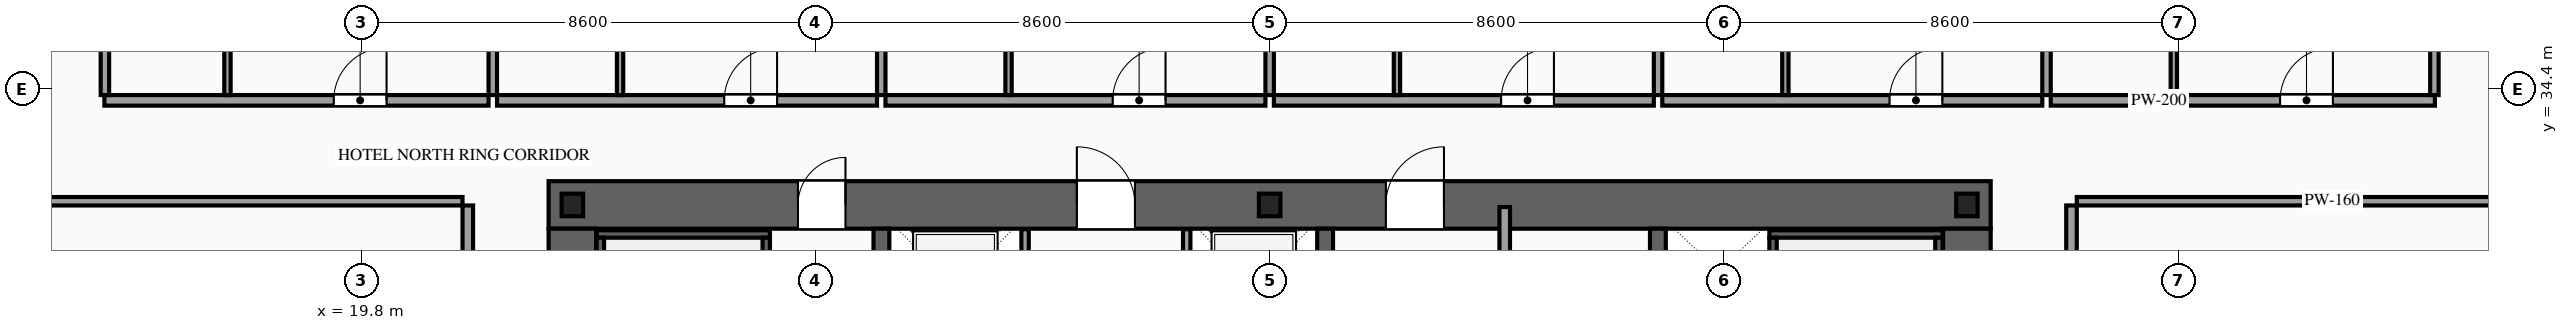
"""IFC4 building model, lengths in metres.
Left out: names, types, materials, properties, quantities, classifications, styles, units other than length and angle.
Written with IfcOpenShell. Run it as: python <this file> out.ifc"""

import sys

from ifc_helpers import new_model, si_unit, direction, frame, frame_2d, origin, origin_2d, place, context, subcontext, project, spatial, rectangle, i_section, extrude, source, transform, mapped, element, fill, save


model = new_model("IFC4")
c1 = context("Model", 3, precision=1e-05, world=origin(), true_north=direction((0.0, 1.0)))
c2 = subcontext(c1, "Body", "Model", "MODEL_VIEW")
j1 = project(units=[si_unit("LENGTHUNIT", "METRE"), si_unit("PLANEANGLEUNIT", "RADIAN")], contexts=[c1])
p1 = place(None, origin())
s1 = spatial("IfcSite", under=j1, at=p1, CompositionType="ELEMENT")
p2 = place(p1, origin())
s2 = spatial("IfcBuilding", under=s1, at=p2, CompositionType="ELEMENT")
p3 = place(p2, frame((0.0, 0.0, 37.8)))
s3 = spatial("IfcBuildingStorey", under=s2, at=p3, CompositionType="ELEMENT", Elevation=37.8)
p4 = place(p3, frame((23.35, 32.2, 0.0), z_axis=(0.0, 0.0, 1.0), x_axis=(1.0, 0.0, 0.0)))
e1 = element("IfcWall", 1, at=p4, inside=s3, PredefinedType="SHEAR", context=c2, shape_type="SweptSolid", body=[
    extrude(rectangle(XDim=27.3, YDim=0.9, at=frame_2d((13.65, 0.0))), origin(), (0.0, 0.0, 1.0), 3.6),
])
p5 = place(p4, frame((4.72, 0.0, 0.0)))
e2 = element("IfcOpeningElement", 2, at=p5, cuts=e1, PredefinedType="OPENING", context=c2, shape_type="SweptSolid", body=[
    extrude(rectangle(XDim=0.9, YDim=2.15, at=frame_2d((0.45, 1.075))), frame((0.0, 0.465, 0.0), z_axis=(0.0, -1.0, 0.0), x_axis=(1.0, 0.0, 0.0)), (0.0, 0.0, 1.0), 0.93),
])
p6 = place(p4, frame((10.0, 0.0, 0.0)))
e3 = element("IfcOpeningElement", 3, at=p6, cuts=e1, PredefinedType="OPENING", context=c2, shape_type="SweptSolid", body=[
    extrude(rectangle(XDim=1.1, YDim=2.2, at=frame_2d((0.55, 1.1))), frame((0.0, 0.465, 0.0), z_axis=(0.0, -1.0, 0.0), x_axis=(1.0, 0.0, 0.0)), (0.0, 0.0, 1.0), 0.93),
])
p7 = place(p4, frame((15.85, 0.0, 0.0)))
e4 = element("IfcOpeningElement", 4, at=p7, cuts=e1, PredefinedType="OPENING", context=c2, shape_type="SweptSolid", body=[
    extrude(rectangle(XDim=1.1, YDim=2.2, at=frame_2d((0.55, 1.1))), frame((0.0, 0.465, 0.0), z_axis=(0.0, -1.0, 0.0), x_axis=(1.0, 0.0, 0.0)), (0.0, 0.0, 1.0), 0.93),
])
m1 = source(origin(), c2, "Body", "SweptSolid", [
    extrude(rectangle(XDim=11.9, YDim=0.9, at=frame_2d((5.95, 0.0))), origin(), (0.0, 0.0, 1.0), 3.6),
])
for number, where, z_axis, x_axis in (
    (5, (23.8, 19.85, 0.0), (0.0, 0.0, 1.0), (0.0, 1.0, 0.0)),
    (6, (50.2, 19.85, 0.0), (0.0, 0.0, 1.0), (0.0, 1.0, 0.0)),
):
    element("IfcWall", number, at=place(p3, frame(where, z_axis=z_axis, x_axis=x_axis)), inside=s3, PredefinedType="SHEAR", context=c2, shape_type="MappedRepresentation", body=[
        mapped(m1, transform((0.0, 0.0, 0.0), scale=1.0)),
    ])
m2 = source(origin(), c2, "Body", "SweptSolid", [
    extrude(rectangle(XDim=11.9, YDim=0.3, at=frame_2d((5.95, 0.0))), origin(), (0.0, 0.0, 1.0), 3.6),
])
for number, where, z_axis, x_axis in (
    (7, (29.65, 19.85, 0.0), (0.0, 0.0, 1.0), (0.0, 1.0, 0.0)),
    (8, (38.05, 19.85, 0.0), (0.0, 0.0, 1.0), (0.0, 1.0, 0.0)),
    (9, (44.35, 19.85, 0.0), (0.0, 0.0, 1.0), (0.0, 1.0, 0.0)),
):
    element("IfcWall", number, at=place(p3, frame(where, z_axis=z_axis, x_axis=x_axis)), inside=s3, PredefinedType="SOLIDWALL", context=c2, shape_type="MappedRepresentation", body=[
        mapped(m2, transform((0.0, 0.0, 0.0), scale=1.0)),
    ])
m3 = source(origin(), c2, "Body", "SweptSolid", [
    extrude(i_section(OverallWidth=0.407, OverallDepth=0.428, WebThickness=0.02, FlangeThickness=0.035, at=origin_2d()), origin(), (0.0, 0.0, 1.0), 3.6),
])
for number, where, z_axis, x_axis in (
    (10, (23.8, 32.2, 0.0), (0.0, 0.0, 1.0), (1.0, 0.0, 0.0)),
    (11, (37.0, 32.2, 0.0), (0.0, 0.0, 1.0), (1.0, 0.0, 0.0)),
    (12, (50.2, 32.2, 0.0), (0.0, 0.0, 1.0), (1.0, 0.0, 0.0)),
):
    element("IfcColumn", number, at=place(p3, frame(where, z_axis=z_axis, x_axis=x_axis)), inside=s3, PredefinedType="COLUMN", context=c2, shape_type="MappedRepresentation", body=[
        mapped(m3, transform((0.0, 0.0, 0.0), scale=1.0)),
    ])
p8 = place(p3, frame((32.37, 29.4, 0.0), z_axis=(0.0, 0.0, 1.0), x_axis=(0.0, 1.0, 0.0)))
e13 = element("IfcWall", 13, at=p8, inside=s3, PredefinedType="SOLIDWALL", context=c2, shape_type="SweptSolid", body=[
    extrude(rectangle(XDim=2.34, YDim=0.14, at=frame_2d((1.17, 0.0))), origin(), (0.0, 0.0, 1.0), 3.32),
])
p9 = place(p8, frame((0.62, 0.0, 0.0)))
e14 = element("IfcOpeningElement", 14, at=p9, cuts=e13, PredefinedType="OPENING", context=c2, shape_type="SweptSolid", body=[
    extrude(rectangle(XDim=1.1, YDim=2.2, at=frame_2d((0.55, 1.1))), frame((0.0, 0.085, 0.0), z_axis=(0.0, -1.0, 0.0), x_axis=(1.0, 0.0, 0.0)), (0.0, 0.0, 1.0), 0.17),
])
p10 = place(p3, frame((35.43, 29.4, 0.0), z_axis=(0.0, 0.0, 1.0), x_axis=(0.0, 1.0, 0.0)))
e15 = element("IfcWall", 15, at=p10, inside=s3, PredefinedType="SOLIDWALL", context=c2, shape_type="SweptSolid", body=[
    extrude(rectangle(XDim=2.34, YDim=0.14, at=frame_2d((1.17, 0.0))), origin(), (0.0, 0.0, 1.0), 3.32),
])
p11 = place(p10, frame((0.62, 0.0, 0.0)))
e16 = element("IfcOpeningElement", 16, at=p11, cuts=e15, PredefinedType="OPENING", context=c2, shape_type="SweptSolid", body=[
    extrude(rectangle(XDim=1.1, YDim=2.2, at=frame_2d((0.55, 1.1))), frame((0.0, 0.085, 0.0), z_axis=(0.0, -1.0, 0.0), x_axis=(1.0, 0.0, 0.0)), (0.0, 0.0, 1.0), 0.17),
])
m4 = source(origin(), c2, "Body", "SweptSolid", [
    extrude(rectangle(XDim=3.28, YDim=0.14, at=frame_2d((1.64, 0.0))), origin(), (0.0, 0.0, 1.0), 3.32),
])
p12 = place(p3, frame((24.26, 31.65, 0.0), z_axis=(0.0, 0.0, 1.0), x_axis=(1.0, 0.0, 0.0)))
e17 = element("IfcWall", 17, at=p12, inside=s3, PredefinedType="SOLIDWALL", context=c2, shape_type="MappedRepresentation", body=[
    mapped(m4, transform((0.0, 0.0, 0.0), scale=1.0)),
])
m5 = source(origin(), c2, "Body", "SweptSolid", [
    extrude(rectangle(XDim=8.94, YDim=0.14, at=frame_2d((4.47, 0.0))), origin(), (0.0, 0.0, 1.0), 3.32),
])
for number, where, z_axis, x_axis in (
    (18, (24.33, 22.64, 0.0), (0.0, 0.0, 1.0), (0.0, 1.0, 0.0)),
    (19, (27.47, 22.64, 0.0), (0.0, 0.0, 1.0), (0.0, 1.0, 0.0)),
):
    element("IfcWall", number, at=place(p3, frame(where, z_axis=z_axis, x_axis=x_axis)), inside=s3, PredefinedType="SOLIDWALL", context=c2, shape_type="MappedRepresentation", body=[
        mapped(m5, transform((0.0, 0.0, 0.0), scale=1.0)),
    ])
p13 = place(p3, frame((46.46, 31.65, 0.0), z_axis=(0.0, 0.0, 1.0), x_axis=(1.0, 0.0, 0.0)))
e20 = element("IfcWall", 20, at=p13, inside=s3, PredefinedType="SOLIDWALL", context=c2, shape_type="MappedRepresentation", body=[
    mapped(m4, transform((0.0, 0.0, 0.0), scale=1.0)),
])
for number, where, z_axis, x_axis in (
    (21, (46.53, 22.64, 0.0), (0.0, 0.0, 1.0), (0.0, 1.0, 0.0)),
    (22, (49.67, 22.64, 0.0), (0.0, 0.0, 1.0), (0.0, 1.0, 0.0)),
):
    element("IfcWall", number, at=place(p3, frame(where, z_axis=z_axis, x_axis=x_axis)), inside=s3, PredefinedType="SOLIDWALL", context=c2, shape_type="MappedRepresentation", body=[
        mapped(m5, transform((0.0, 0.0, 0.0), scale=1.0)),
    ])
m6 = source(origin(), c2, "Body", "SweptSolid", [
    extrude(rectangle(XDim=12.72, YDim=0.2, at=frame_2d((6.36, 0.0))), origin(), (0.0, 0.0, 1.0), 3.32),
])
p14 = place(p3, frame((41.45, 19.44, 0.0), z_axis=(0.0, 0.0, 1.0), x_axis=(0.0, 1.0, 0.0)))
e23 = element("IfcWall", 23, at=p14, inside=s3, PredefinedType="PARTITIONING", context=c2, shape_type="MappedRepresentation", body=[
    mapped(m6, transform((0.0, 0.0, 0.0), scale=1.0)),
])
p15 = place(p3, frame((14.94, 34.18, 0.0), z_axis=(0.0, 0.0, 1.0), x_axis=(1.0, 0.0, 0.0)))
e24 = element("IfcWall", 24, at=p15, inside=s3, PredefinedType="PARTITIONING", context=c2, shape_type="SweptSolid", body=[
    extrude(rectangle(XDim=7.273, YDim=0.2, at=frame_2d((3.636, 0.0))), origin(), (0.0, 0.0, 1.0), 3.32),
])
p16 = place(p15, frame((4.342, 0.0, 0.0)))
e25 = element("IfcOpeningElement", 25, at=p16, cuts=e24, PredefinedType="OPENING", context=c2, shape_type="SweptSolid", body=[
    extrude(rectangle(XDim=1.0, YDim=2.2, at=frame_2d((0.5, 1.1))), frame((0.0, 0.115, 0.0), z_axis=(0.0, -1.0, 0.0), x_axis=(1.0, 0.0, 0.0)), (0.0, 0.0, 1.0), 0.23),
])
m7 = source(origin(), c2, "Body", "SweptSolid", [
    extrude(rectangle(XDim=16.47, YDim=0.16, at=frame_2d((8.235, 0.0))), origin(), (0.0, 0.0, 1.0), 3.32),
])
p17 = place(p3, frame((22.293, 34.28, 0.0), z_axis=(0.0, 0.0, 1.0), x_axis=(0.0, 1.0, 0.0)))
e26 = element("IfcWall", 26, at=p17, inside=s3, PredefinedType="PARTITIONING", context=c2, shape_type="MappedRepresentation", body=[
    mapped(m7, transform((0.0, 0.0, 0.0), scale=1.0)),
])
m8 = source(origin(), c2, "Body", "SweptSolid", [
    extrude(rectangle(XDim=2.42, YDim=0.12, at=frame_2d((1.21, 0.0))), origin(), (0.0, 0.0, 1.0), 3.32),
])
p18 = place(p3, frame((17.27, 34.28, 0.0), z_axis=(0.0, 0.0, 1.0), x_axis=(0.0, 1.0, 0.0)))
e27 = element("IfcWall", 27, at=p18, inside=s3, PredefinedType="PARTITIONING", context=c2, shape_type="MappedRepresentation", body=[
    mapped(m8, transform((0.0, 0.0, 0.0), scale=1.0)),
])
p19 = place(p3, frame((22.373, 34.18, 0.0), z_axis=(0.0, 0.0, 1.0), x_axis=(1.0, 0.0, 0.0)))
e28 = element("IfcWall", 28, at=p19, inside=s3, PredefinedType="PARTITIONING", context=c2, shape_type="SweptSolid", body=[
    extrude(rectangle(XDim=7.194, YDim=0.2, at=frame_2d((3.597, 0.0))), origin(), (0.0, 0.0, 1.0), 3.32),
])
p20 = place(p19, frame((4.302, 0.0, 0.0)))
e29 = element("IfcOpeningElement", 29, at=p20, cuts=e28, PredefinedType="OPENING", context=c2, shape_type="SweptSolid", body=[
    extrude(rectangle(XDim=1.0, YDim=2.2, at=frame_2d((0.5, 1.1))), frame((0.0, 0.115, 0.0), z_axis=(0.0, -1.0, 0.0), x_axis=(1.0, 0.0, 0.0)), (0.0, 0.0, 1.0), 0.23),
])
p21 = place(p3, frame((29.647, 34.28, 0.0), z_axis=(0.0, 0.0, 1.0), x_axis=(0.0, 1.0, 0.0)))
e30 = element("IfcWall", 30, at=p21, inside=s3, PredefinedType="PARTITIONING", context=c2, shape_type="MappedRepresentation", body=[
    mapped(m7, transform((0.0, 0.0, 0.0), scale=1.0)),
])
p22 = place(p3, frame((24.703, 34.28, 0.0), z_axis=(0.0, 0.0, 1.0), x_axis=(0.0, 1.0, 0.0)))
e31 = element("IfcWall", 31, at=p22, inside=s3, PredefinedType="PARTITIONING", context=c2, shape_type="MappedRepresentation", body=[
    mapped(m8, transform((0.0, 0.0, 0.0), scale=1.0)),
])
p23 = place(p3, frame((29.727, 34.18, 0.0), z_axis=(0.0, 0.0, 1.0), x_axis=(1.0, 0.0, 0.0)))
e32 = element("IfcWall", 32, at=p23, inside=s3, PredefinedType="PARTITIONING", context=c2, shape_type="SweptSolid", body=[
    extrude(rectangle(XDim=7.193, YDim=0.2, at=frame_2d((3.596, 0.0))), origin(), (0.0, 0.0, 1.0), 3.32),
])
p24 = place(p23, frame((4.302, 0.0, 0.0)))
e33 = element("IfcOpeningElement", 33, at=p24, cuts=e32, PredefinedType="OPENING", context=c2, shape_type="SweptSolid", body=[
    extrude(rectangle(XDim=1.0, YDim=2.2, at=frame_2d((0.5, 1.1))), frame((0.0, 0.115, 0.0), z_axis=(0.0, -1.0, 0.0), x_axis=(1.0, 0.0, 0.0)), (0.0, 0.0, 1.0), 0.23),
])
m9 = source(origin(), c2, "Body", "SweptSolid", [
    extrude(rectangle(XDim=16.47, YDim=0.16, at=frame_2d((8.235, 0.0))), origin(), (0.0, 0.0, 1.0), 2.515),
])
p25 = place(p3, frame((37.0, 34.28, 0.0), z_axis=(0.0, 0.0, 1.0), x_axis=(0.0, 1.0, 0.0)))
e34 = element("IfcWall", 34, at=p25, inside=s3, PredefinedType="PARTITIONING", context=c2, shape_type="MappedRepresentation", body=[
    mapped(m9, transform((0.0, 0.0, 0.0), scale=1.0)),
])
p26 = place(p3, frame((32.057, 34.28, 0.0), z_axis=(0.0, 0.0, 1.0), x_axis=(0.0, 1.0, 0.0)))
e35 = element("IfcWall", 35, at=p26, inside=s3, PredefinedType="PARTITIONING", context=c2, shape_type="MappedRepresentation", body=[
    mapped(m8, transform((0.0, 0.0, 0.0), scale=1.0)),
])
p27 = place(p3, frame((37.08, 34.18, 0.0), z_axis=(0.0, 0.0, 1.0), x_axis=(1.0, 0.0, 0.0)))
e36 = element("IfcWall", 36, at=p27, inside=s3, PredefinedType="PARTITIONING", context=c2, shape_type="SweptSolid", body=[
    extrude(rectangle(XDim=7.193, YDim=0.2, at=frame_2d((3.596, 0.0))), origin(), (0.0, 0.0, 1.0), 3.32),
])
p28 = place(p27, frame((4.302, 0.0, 0.0)))
e37 = element("IfcOpeningElement", 37, at=p28, cuts=e36, PredefinedType="OPENING", context=c2, shape_type="SweptSolid", body=[
    extrude(rectangle(XDim=1.0, YDim=2.2, at=frame_2d((0.5, 1.1))), frame((0.0, 0.115, 0.0), z_axis=(0.0, -1.0, 0.0), x_axis=(1.0, 0.0, 0.0)), (0.0, 0.0, 1.0), 0.23),
])
p29 = place(p3, frame((44.353, 34.28, 0.0), z_axis=(0.0, 0.0, 1.0), x_axis=(0.0, 1.0, 0.0)))
e38 = element("IfcWall", 38, at=p29, inside=s3, PredefinedType="PARTITIONING", context=c2, shape_type="MappedRepresentation", body=[
    mapped(m7, transform((0.0, 0.0, 0.0), scale=1.0)),
])
p30 = place(p3, frame((39.41, 34.28, 0.0), z_axis=(0.0, 0.0, 1.0), x_axis=(0.0, 1.0, 0.0)))
e39 = element("IfcWall", 39, at=p30, inside=s3, PredefinedType="PARTITIONING", context=c2, shape_type="MappedRepresentation", body=[
    mapped(m8, transform((0.0, 0.0, 0.0), scale=1.0)),
])
p31 = place(p3, frame((44.433, 34.18, 0.0), z_axis=(0.0, 0.0, 1.0), x_axis=(1.0, 0.0, 0.0)))
e40 = element("IfcWall", 40, at=p31, inside=s3, PredefinedType="PARTITIONING", context=c2, shape_type="SweptSolid", body=[
    extrude(rectangle(XDim=7.194, YDim=0.2, at=frame_2d((3.597, 0.0))), origin(), (0.0, 0.0, 1.0), 3.32),
])
p32 = place(p31, frame((4.302, 0.0, 0.0)))
e41 = element("IfcOpeningElement", 41, at=p32, cuts=e40, PredefinedType="OPENING", context=c2, shape_type="SweptSolid", body=[
    extrude(rectangle(XDim=1.0, YDim=2.2, at=frame_2d((0.5, 1.1))), frame((0.0, 0.115, 0.0), z_axis=(0.0, -1.0, 0.0), x_axis=(1.0, 0.0, 0.0)), (0.0, 0.0, 1.0), 0.23),
])
p33 = place(p3, frame((51.707, 34.28, 0.0), z_axis=(0.0, 0.0, 1.0), x_axis=(0.0, 1.0, 0.0)))
e42 = element("IfcWall", 42, at=p33, inside=s3, PredefinedType="PARTITIONING", context=c2, shape_type="MappedRepresentation", body=[
    mapped(m7, transform((0.0, 0.0, 0.0), scale=1.0)),
])
p34 = place(p3, frame((46.763, 34.28, 0.0), z_axis=(0.0, 0.0, 1.0), x_axis=(0.0, 1.0, 0.0)))
e43 = element("IfcWall", 43, at=p34, inside=s3, PredefinedType="PARTITIONING", context=c2, shape_type="MappedRepresentation", body=[
    mapped(m8, transform((0.0, 0.0, 0.0), scale=1.0)),
])
p35 = place(p3, frame((51.787, 34.18, 0.0), z_axis=(0.0, 0.0, 1.0), x_axis=(1.0, 0.0, 0.0)))
e44 = element("IfcWall", 44, at=p35, inside=s3, PredefinedType="PARTITIONING", context=c2, shape_type="SweptSolid", body=[
    extrude(rectangle(XDim=7.273, YDim=0.2, at=frame_2d((3.636, 0.0))), origin(), (0.0, 0.0, 1.0), 3.32),
])
p36 = place(p35, frame((4.342, 0.0, 0.0)))
e45 = element("IfcOpeningElement", 45, at=p36, cuts=e44, PredefinedType="OPENING", context=c2, shape_type="SweptSolid", body=[
    extrude(rectangle(XDim=1.0, YDim=2.2, at=frame_2d((0.5, 1.1))), frame((0.0, 0.115, 0.0), z_axis=(0.0, -1.0, 0.0), x_axis=(1.0, 0.0, 0.0)), (0.0, 0.0, 1.0), 0.23),
])
m10 = source(origin(), c2, "Body", "SweptSolid", [
    extrude(rectangle(XDim=16.32, YDim=0.16, at=frame_2d((8.16, 0.0))), origin(), (0.0, 0.0, 1.0), 3.32),
])
for number, where, z_axis, x_axis in (
    (46, (14.95, 34.28, 0.0), (0.0, 0.0, 1.0), (0.0, 1.0, 0.0)),
    (47, (59.05, 34.28, 0.0), (0.0, 0.0, 1.0), (0.0, 1.0, 0.0)),
):
    element("IfcWall", number, at=place(p3, frame(where, z_axis=z_axis, x_axis=x_axis)), inside=s3, PredefinedType="PARTITIONING", context=c2, shape_type="MappedRepresentation", body=[
        mapped(m10, transform((0.0, 0.0, 0.0), scale=1.0)),
    ])
p37 = place(p3, frame((54.117, 34.28, 0.0), z_axis=(0.0, 0.0, 1.0), x_axis=(0.0, 1.0, 0.0)))
e48 = element("IfcWall", 48, at=p37, inside=s3, PredefinedType="PARTITIONING", context=c2, shape_type="MappedRepresentation", body=[
    mapped(m8, transform((0.0, 0.0, 0.0), scale=1.0)),
])
p38 = place(p3, frame((21.82, 25.88, 0.0), z_axis=(0.0, 0.0, 1.0), x_axis=(0.0, 1.0, 0.0)))
e49 = element("IfcWall", 49, at=p38, inside=s3, PredefinedType="PARTITIONING", context=c2, shape_type="SweptSolid", body=[
    extrude(rectangle(XDim=6.31, YDim=0.2, at=frame_2d((3.155, 0.0))), origin(), (0.0, 0.0, 1.0), 3.32),
])
p39 = place(p38, frame((3.835, 0.0, 0.0)))
e50 = element("IfcOpeningElement", 50, at=p39, cuts=e49, PredefinedType="OPENING", context=c2, shape_type="SweptSolid", body=[
    extrude(rectangle(XDim=1.0, YDim=2.2, at=frame_2d((0.5, 1.1))), frame((0.0, 0.115, 0.0), z_axis=(0.0, -1.0, 0.0), x_axis=(1.0, 0.0, 0.0)), (0.0, 0.0, 1.0), 0.23),
])
m11 = source(origin(), c2, "Body", "SweptSolid", [
    extrude(rectangle(XDim=9.67, YDim=0.16, at=frame_2d((4.835, 0.0))), origin(), (0.0, 0.0, 1.0), 2.815),
])
p40 = place(p3, frame((12.05, 32.27, 0.0), z_axis=(0.0, 0.0, 1.0), x_axis=(1.0, 0.0, 0.0)))
e51 = element("IfcWall", 51, at=p40, inside=s3, PredefinedType="PARTITIONING", context=c2, shape_type="MappedRepresentation", body=[
    mapped(m11, transform((0.0, 0.0, 0.0), scale=1.0)),
])
p41 = place(p3, frame((52.18, 25.88, 0.0), z_axis=(0.0, 0.0, 1.0), x_axis=(0.0, 1.0, 0.0)))
e52 = element("IfcWall", 52, at=p41, inside=s3, PredefinedType="PARTITIONING", context=c2, shape_type="SweptSolid", body=[
    extrude(rectangle(XDim=6.31, YDim=0.2, at=frame_2d((3.155, 0.0))), origin(), (0.0, 0.0, 1.0), 3.32),
])
p42 = place(p41, frame((3.835, 0.0, 0.0)))
e53 = element("IfcOpeningElement", 53, at=p42, cuts=e52, PredefinedType="OPENING", context=c2, shape_type="SweptSolid", body=[
    extrude(rectangle(XDim=1.0, YDim=2.2, at=frame_2d((0.5, 1.1))), frame((0.0, 0.115, 0.0), z_axis=(0.0, -1.0, 0.0), x_axis=(1.0, 0.0, 0.0)), (0.0, 0.0, 1.0), 0.23),
])
p43 = place(p3, frame((52.28, 32.27, 0.0), z_axis=(0.0, 0.0, 1.0), x_axis=(1.0, 0.0, 0.0)))
e54 = element("IfcWall", 54, at=p43, inside=s3, PredefinedType="PARTITIONING", context=c2, shape_type="MappedRepresentation", body=[
    mapped(m11, transform((0.0, 0.0, 0.0), scale=1.0)),
])
m12 = source(origin(), c2, "Body", "SweptSolid", [
    extrude(rectangle(XDim=0.9, YDim=2.15, at=frame_2d((0.45, 1.075))), frame((0.0, 0.025, 0.0), z_axis=(0.0, -1.0, 0.0), x_axis=(1.0, 0.0, 0.0)), (0.0, 0.0, 1.0), 0.05),
])
p44 = place(p5, origin())
e55 = element("IfcDoor", 55, at=p44, inside=s3, OperationType="SINGLE_SWING_RIGHT", PredefinedType="DOOR", context=c2, shape_type="MappedRepresentation", body=[
    mapped(m12, transform((0.0, 0.0, 0.0), scale=1.0)),
])
fill(e2, e55)
m13 = source(origin(), c2, "Body", "SweptSolid", [
    extrude(rectangle(XDim=1.1, YDim=2.2, at=frame_2d((0.55, 1.1))), frame((0.0, 0.025, 0.0), z_axis=(0.0, -1.0, 0.0), x_axis=(1.0, 0.0, 0.0)), (0.0, 0.0, 1.0), 0.05),
])
p45 = place(p6, origin())
e56 = element("IfcDoor", 56, at=p45, inside=s3, OperationType="SINGLE_SWING_LEFT", PredefinedType="DOOR", context=c2, shape_type="MappedRepresentation", body=[
    mapped(m13, transform((0.0, 0.0, 0.0), scale=1.0)),
])
fill(e3, e56)
p46 = place(p7, origin())
e57 = element("IfcDoor", 57, at=p46, inside=s3, OperationType="SINGLE_SWING_RIGHT", PredefinedType="DOOR", context=c2, shape_type="MappedRepresentation", body=[
    mapped(m13, transform((0.0, 0.0, 0.0), scale=1.0)),
])
fill(e4, e57)
m14 = source(origin(), c2, "Body", "SweptSolid", [
    extrude(rectangle(XDim=1.0, YDim=2.2, at=frame_2d((0.5, 1.1))), frame((0.0, 0.025, 0.0), z_axis=(0.0, -1.0, 0.0), x_axis=(1.0, 0.0, 0.0)), (0.0, 0.0, 1.0), 0.05),
])
p47 = place(p16, origin())
e58 = element("IfcDoor", 58, at=p47, inside=s3, OperationType="SINGLE_SWING_RIGHT", PredefinedType="DOOR", context=c2, shape_type="MappedRepresentation", body=[
    mapped(m14, transform((0.0, 0.0, 0.0), scale=1.0)),
])
fill(e25, e58)
p48 = place(p20, origin())
e59 = element("IfcDoor", 59, at=p48, inside=s3, OperationType="SINGLE_SWING_RIGHT", PredefinedType="DOOR", context=c2, shape_type="MappedRepresentation", body=[
    mapped(m14, transform((0.0, 0.0, 0.0), scale=1.0)),
])
fill(e29, e59)
p49 = place(p24, origin())
e60 = element("IfcDoor", 60, at=p49, inside=s3, OperationType="SINGLE_SWING_RIGHT", PredefinedType="DOOR", context=c2, shape_type="MappedRepresentation", body=[
    mapped(m14, transform((0.0, 0.0, 0.0), scale=1.0)),
])
fill(e33, e60)
p50 = place(p28, origin())
e61 = element("IfcDoor", 61, at=p50, inside=s3, OperationType="SINGLE_SWING_RIGHT", PredefinedType="DOOR", context=c2, shape_type="MappedRepresentation", body=[
    mapped(m14, transform((0.0, 0.0, 0.0), scale=1.0)),
])
fill(e37, e61)
p51 = place(p32, origin())
e62 = element("IfcDoor", 62, at=p51, inside=s3, OperationType="SINGLE_SWING_RIGHT", PredefinedType="DOOR", context=c2, shape_type="MappedRepresentation", body=[
    mapped(m14, transform((0.0, 0.0, 0.0), scale=1.0)),
])
fill(e41, e62)
p52 = place(p36, origin())
e63 = element("IfcDoor", 63, at=p52, inside=s3, OperationType="SINGLE_SWING_RIGHT", PredefinedType="DOOR", context=c2, shape_type="MappedRepresentation", body=[
    mapped(m14, transform((0.0, 0.0, 0.0), scale=1.0)),
])
fill(e45, e63)
save(model, sys.argv[1])
